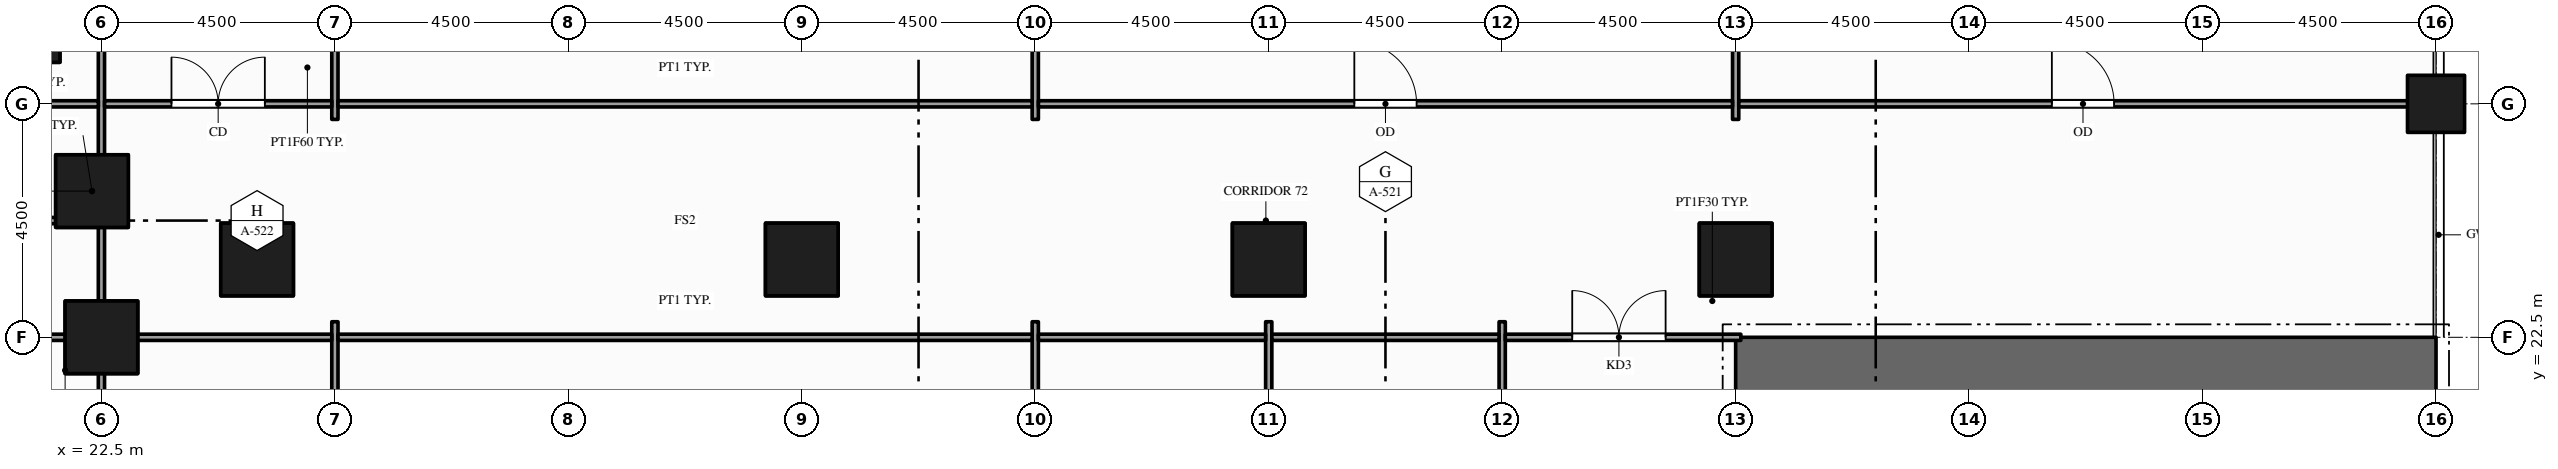
"""IFC4 building model, lengths in metres.
Left out: names, types, materials, properties, quantities, classifications, styles, units other than length and angle.
Written with IfcOpenShell. Run it as: python <this file> out.ifc"""

import sys

from ifc_helpers import new_model, si_unit, direction, frame, frame_2d, origin, origin_2d, place, context, subcontext, project, spatial, rectangle, hollow_rectangle, extrude, element, fill, save


model = new_model("IFC4")
c1 = context("Model", 3, precision=1e-05, world=origin(), true_north=direction((0.0, 1.0)))
c2 = subcontext(c1, "Body", "Model", "MODEL_VIEW")
j1 = project(units=[si_unit("LENGTHUNIT", "METRE"), si_unit("PLANEANGLEUNIT", "RADIAN")], contexts=[c1])
p1 = place(None, origin())
s1 = spatial("IfcSite", under=j1, at=p1, CompositionType="ELEMENT")
p2 = place(p1, origin())
s2 = spatial("IfcBuilding", under=s1, at=p2, CompositionType="ELEMENT")
p3 = place(p2, frame((0.0, 0.0, 24.0)))
s3 = spatial("IfcBuildingStorey", under=s2, at=p3, CompositionType="ELEMENT", Elevation=24.0)
p4 = place(p3, frame((54.0, 21.9, -0.15), z_axis=(0.0, 0.0, 1.0), x_axis=(1.0, 0.0, 0.0)))
e1 = element("IfcWall", 1, at=p4, inside=s3, PredefinedType="SHEAR", context=c2, shape_type="SweptSolid", body=[
    extrude(rectangle(XDim=13.5, YDim=1.2, at=frame_2d((6.75, 0.0))), origin(), (0.0, 0.0, 1.0), 5.0),
])
p5 = place(p3, frame((21.0, 28.5, -0.25), z_axis=(0.0, 0.0, 1.0), x_axis=(1.0, 0.0, 0.0)))
e2 = element("IfcColumn", 2, at=p5, inside=s3, PredefinedType="COLUMN", context=c2, shape_type="SweptSolid", body=[
    extrude(hollow_rectangle(XDim=1.4, YDim=1.4, WallThickness=0.08, at=origin_2d()), origin(), (0.0, 0.0, 1.0), 3.45),
])
p6 = place(p3, frame((21.0, 28.5, 3.2), z_axis=(0.0, 0.0, 1.0), x_axis=(1.0, 0.0, 0.0)))
e3 = element("IfcColumn", 3, at=p6, inside=s3, PredefinedType="COLUMN", context=c2, shape_type="SweptSolid", body=[
    extrude(rectangle(XDim=1.4, YDim=1.4, at=origin_2d()), origin(), (0.0, 0.0, 1.0), 1.5),
])
p7 = place(p3, frame((22.318, 25.318, -0.25), z_axis=(0.0, 0.0, 1.0), x_axis=(1.0, 0.0, 0.0)))
e4 = element("IfcColumn", 4, at=p7, inside=s3, PredefinedType="COLUMN", context=c2, shape_type="SweptSolid", body=[
    extrude(hollow_rectangle(XDim=1.4, YDim=1.4, WallThickness=0.08, at=origin_2d()), origin(), (0.0, 0.0, 1.0), 3.45),
])
p8 = place(p3, frame((22.318, 25.318, 3.2), z_axis=(0.0, 0.0, 1.0), x_axis=(1.0, 0.0, 0.0)))
e5 = element("IfcColumn", 5, at=p8, inside=s3, PredefinedType="COLUMN", context=c2, shape_type="SweptSolid", body=[
    extrude(rectangle(XDim=1.4, YDim=1.4, at=origin_2d()), origin(), (0.0, 0.0, 1.0), 1.5),
])
p9 = place(p3, frame((22.5, 22.5, -0.25), z_axis=(0.0, 0.0, 1.0), x_axis=(1.0, 0.0, 0.0)))
e6 = element("IfcColumn", 6, at=p9, inside=s3, PredefinedType="COLUMN", context=c2, shape_type="SweptSolid", body=[
    extrude(hollow_rectangle(XDim=1.4, YDim=1.4, WallThickness=0.08, at=origin_2d()), origin(), (0.0, 0.0, 1.0), 3.6),
])
p10 = place(p3, frame((22.5, 22.5, 3.35), z_axis=(0.0, 0.0, 1.0), x_axis=(1.0, 0.0, 0.0)))
e7 = element("IfcColumn", 7, at=p10, inside=s3, PredefinedType="COLUMN", context=c2, shape_type="SweptSolid", body=[
    extrude(rectangle(XDim=1.4, YDim=1.4, at=origin_2d()), origin(), (0.0, 0.0, 1.0), 1.5),
])
p11 = place(p3, frame((25.5, 24.0, -0.25), z_axis=(0.0, 0.0, 1.0), x_axis=(1.0, 0.0, 0.0)))
e8 = element("IfcColumn", 8, at=p11, inside=s3, PredefinedType="COLUMN", context=c2, shape_type="SweptSolid", body=[
    extrude(hollow_rectangle(XDim=1.4, YDim=1.4, WallThickness=0.08, at=origin_2d()), origin(), (0.0, 0.0, 1.0), 3.45),
])
p12 = place(p3, frame((25.5, 24.0, 3.2), z_axis=(0.0, 0.0, 1.0), x_axis=(1.0, 0.0, 0.0)))
e9 = element("IfcColumn", 9, at=p12, inside=s3, PredefinedType="COLUMN", context=c2, shape_type="SweptSolid", body=[
    extrude(rectangle(XDim=1.4, YDim=1.4, at=origin_2d()), origin(), (0.0, 0.0, 1.0), 1.5),
])
p13 = place(p3, frame((36.0, 24.0, -0.25), z_axis=(0.0, 0.0, 1.0), x_axis=(1.0, 0.0, 0.0)))
e10 = element("IfcColumn", 10, at=p13, inside=s3, PredefinedType="COLUMN", context=c2, shape_type="SweptSolid", body=[
    extrude(hollow_rectangle(XDim=1.4, YDim=1.4, WallThickness=0.08, at=origin_2d()), origin(), (0.0, 0.0, 1.0), 3.45),
])
p14 = place(p3, frame((36.0, 24.0, 3.2), z_axis=(0.0, 0.0, 1.0), x_axis=(1.0, 0.0, 0.0)))
e11 = element("IfcColumn", 11, at=p14, inside=s3, PredefinedType="COLUMN", context=c2, shape_type="SweptSolid", body=[
    extrude(rectangle(XDim=1.4, YDim=1.4, at=origin_2d()), origin(), (0.0, 0.0, 1.0), 1.5),
])
p15 = place(p3, frame((45.0, 24.0, -0.25), z_axis=(0.0, 0.0, 1.0), x_axis=(1.0, 0.0, 0.0)))
e12 = element("IfcColumn", 12, at=p15, inside=s3, PredefinedType="COLUMN", context=c2, shape_type="SweptSolid", body=[
    extrude(hollow_rectangle(XDim=1.4, YDim=1.4, WallThickness=0.08, at=origin_2d()), origin(), (0.0, 0.0, 1.0), 3.45),
])
p16 = place(p3, frame((45.0, 24.0, 3.2), z_axis=(0.0, 0.0, 1.0), x_axis=(1.0, 0.0, 0.0)))
e13 = element("IfcColumn", 13, at=p16, inside=s3, PredefinedType="COLUMN", context=c2, shape_type="SweptSolid", body=[
    extrude(rectangle(XDim=1.4, YDim=1.4, at=origin_2d()), origin(), (0.0, 0.0, 1.0), 1.5),
])
p17 = place(p3, frame((54.0, 24.0, -0.25), z_axis=(0.0, 0.0, 1.0), x_axis=(1.0, 0.0, 0.0)))
e14 = element("IfcColumn", 14, at=p17, inside=s3, PredefinedType="COLUMN", context=c2, shape_type="SweptSolid", body=[
    extrude(hollow_rectangle(XDim=1.4, YDim=1.4, WallThickness=0.08, at=origin_2d()), origin(), (0.0, 0.0, 1.0), 3.45),
])
p18 = place(p3, frame((54.0, 24.0, 3.2), z_axis=(0.0, 0.0, 1.0), x_axis=(1.0, 0.0, 0.0)))
e15 = element("IfcColumn", 15, at=p18, inside=s3, PredefinedType="COLUMN", context=c2, shape_type="SweptSolid", body=[
    extrude(rectangle(XDim=1.4, YDim=1.4, at=origin_2d()), origin(), (0.0, 0.0, 1.0), 1.5),
])
p19 = place(p3, frame((67.5, 27.0, -0.25), z_axis=(0.0, 0.0, 1.0), x_axis=(1.0, 0.0, 0.0)))
e16 = element("IfcColumn", 16, at=p19, inside=s3, PredefinedType="COLUMN", context=c2, shape_type="SweptSolid", body=[
    extrude(hollow_rectangle(XDim=1.1, YDim=1.1, WallThickness=0.06, at=origin_2d()), origin(), (0.0, 0.0, 1.0), 4.95),
])
p20 = place(p3, frame((22.5, 0.15, 0.0), z_axis=(0.0, 0.0, 1.0), x_axis=(0.0, 1.0, 0.0)))
e17 = element("IfcWall", 17, at=p20, inside=s3, PredefinedType="PARTITIONING", context=c2, shape_type="SweptSolid", body=[
    extrude(rectangle(XDim=35.95, YDim=0.12, at=frame_2d((17.975, 0.0))), origin(), (0.0, 0.0, 1.0), 3.3),
])
p21 = place(p20, frame((9.225, 0.0, 0.0)))
e18 = element("IfcOpeningElement", 18, at=p21, cuts=e17, PredefinedType="OPENING", context=c2, shape_type="SweptSolid", body=[
    extrude(rectangle(XDim=1.5, YDim=2.1, at=frame_2d((0.75, 1.05))), frame((0.0, 0.07, 0.0), z_axis=(0.0, -1.0, 0.0), x_axis=(1.0, 0.0, 0.0)), (0.0, 0.0, 1.0), 0.14),
])
p22 = place(p20, frame((32.7, 0.0, 0.0)))
e19 = element("IfcOpeningElement", 19, at=p22, cuts=e17, PredefinedType="OPENING", context=c2, shape_type="SweptSolid", body=[
    extrude(rectangle(XDim=1.8, YDim=2.1, at=frame_2d((0.9, 1.05))), frame((0.0, 0.07, 0.0), z_axis=(0.0, -1.0, 0.0), x_axis=(1.0, 0.0, 0.0)), (0.0, 0.0, 1.0), 0.14),
])
p23 = place(p3, frame((27.0, 10.95, 0.0), z_axis=(0.0, 0.0, 1.0), x_axis=(0.0, 1.0, 0.0)))
e20 = element("IfcWall", 20, at=p23, inside=s3, PredefinedType="PARTITIONING", context=c2, shape_type="SweptSolid", body=[
    extrude(rectangle(XDim=11.85, YDim=0.12, at=frame_2d((5.925, 0.0))), origin(), (0.0, 0.0, 1.0), 3.938),
])
p24 = place(p3, frame((27.0, 26.7, 0.0), z_axis=(0.0, 0.0, 1.0), x_axis=(0.0, 1.0, 0.0)))
e21 = element("IfcWall", 21, at=p24, inside=s3, PredefinedType="PARTITIONING", context=c2, shape_type="SweptSolid", body=[
    extrude(rectangle(XDim=22.65, YDim=0.12, at=frame_2d((11.325, 0.0))), origin(), (0.0, 0.0, 1.0), 3.61),
])
p25 = place(p24, frame((10.895, 0.0, 0.0)))
e22 = element("IfcOpeningElement", 22, at=p25, cuts=e21, PredefinedType="OPENING", context=c2, shape_type="SweptSolid", body=[
    extrude(rectangle(XDim=1.2, YDim=2.1, at=frame_2d((0.6, 1.05))), frame((0.0, 0.07, 0.0), z_axis=(0.0, -1.0, 0.0), x_axis=(1.0, 0.0, 0.0)), (0.0, 0.0, 1.0), 0.14),
])
p26 = place(p3, frame((40.5, 10.95, 0.0), z_axis=(0.0, 0.0, 1.0), x_axis=(0.0, 1.0, 0.0)))
e23 = element("IfcWall", 23, at=p26, inside=s3, PredefinedType="PARTITIONING", context=c2, shape_type="SweptSolid", body=[
    extrude(rectangle(XDim=11.85, YDim=0.12, at=frame_2d((5.925, 0.0))), origin(), (0.0, 0.0, 1.0), 3.938),
])
p27 = place(p3, frame((40.5, 26.7, 0.0), z_axis=(0.0, 0.0, 1.0), x_axis=(0.0, 1.0, 0.0)))
e24 = element("IfcWall", 24, at=p27, inside=s3, PredefinedType="PARTITIONING", context=c2, shape_type="SweptSolid", body=[
    extrude(rectangle(XDim=22.65, YDim=0.12, at=frame_2d((11.325, 0.0))), origin(), (0.0, 0.0, 1.0), 3.61),
])
p28 = place(p3, frame((45.0, 0.15, 0.0), z_axis=(0.0, 0.0, 1.0), x_axis=(0.0, 1.0, 0.0)))
e25 = element("IfcWall", 25, at=p28, inside=s3, PredefinedType="PARTITIONING", context=c2, shape_type="SweptSolid", body=[
    extrude(rectangle(XDim=22.65, YDim=0.12, at=frame_2d((11.325, 0.0))), origin(), (0.0, 0.0, 1.0), 3.3),
])
p29 = place(p28, frame((9.225, 0.0, 0.0)))
e26 = element("IfcOpeningElement", 26, at=p29, cuts=e25, PredefinedType="OPENING", context=c2, shape_type="SweptSolid", body=[
    extrude(rectangle(XDim=1.5, YDim=2.1, at=frame_2d((0.75, 1.05))), frame((0.0, 0.07, 0.0), z_axis=(0.0, -1.0, 0.0), x_axis=(1.0, 0.0, 0.0)), (0.0, 0.0, 1.0), 0.14),
])
p30 = place(p3, frame((49.5, 0.15, 0.0), z_axis=(0.0, 0.0, 1.0), x_axis=(0.0, 1.0, 0.0)))
e27 = element("IfcWall", 27, at=p30, inside=s3, PredefinedType="PARTITIONING", context=c2, shape_type="SweptSolid", body=[
    extrude(rectangle(XDim=22.65, YDim=0.12, at=frame_2d((11.325, 0.0))), origin(), (0.0, 0.0, 1.0), 3.3),
])
p31 = place(p30, frame((0.955, 0.0, 0.0)))
e28 = element("IfcOpeningElement", 28, at=p31, cuts=e27, PredefinedType="OPENING", context=c2, shape_type="SweptSolid", body=[
    extrude(rectangle(XDim=0.9, YDim=2.1, at=frame_2d((0.45, 1.05))), frame((0.0, 0.07, 0.0), z_axis=(0.0, -1.0, 0.0), x_axis=(1.0, 0.0, 0.0)), (0.0, 0.0, 1.0), 0.14),
])
p32 = place(p30, frame((3.9, 0.0, 0.0)))
e29 = element("IfcOpeningElement", 29, at=p32, cuts=e27, PredefinedType="OPENING", context=c2, shape_type="SweptSolid", body=[
    extrude(rectangle(XDim=0.9, YDim=2.1, at=frame_2d((0.45, 1.05))), frame((0.0, 0.07, 0.0), z_axis=(0.0, -1.0, 0.0), x_axis=(1.0, 0.0, 0.0)), (0.0, 0.0, 1.0), 0.14),
])
p33 = place(p30, frame((6.85, 0.0, 0.0)))
e30 = element("IfcOpeningElement", 30, at=p33, cuts=e27, PredefinedType="OPENING", context=c2, shape_type="SweptSolid", body=[
    extrude(rectangle(XDim=1.0, YDim=2.1, at=frame_2d((0.5, 1.05))), frame((0.0, 0.07, 0.0), z_axis=(0.0, -1.0, 0.0), x_axis=(1.0, 0.0, 0.0)), (0.0, 0.0, 1.0), 0.14),
])
p34 = place(p30, frame((16.275, 0.0, 0.0)))
e31 = element("IfcOpeningElement", 31, at=p34, cuts=e27, PredefinedType="OPENING", context=c2, shape_type="SweptSolid", body=[
    extrude(rectangle(XDim=0.9, YDim=2.1, at=frame_2d((0.45, 1.05))), frame((0.0, 0.07, 0.0), z_axis=(0.0, -1.0, 0.0), x_axis=(1.0, 0.0, 0.0)), (0.0, 0.0, 1.0), 0.14),
])
p35 = place(p30, frame((9.225, 0.0, 0.0)))
e32 = element("IfcOpeningElement", 32, at=p35, cuts=e27, PredefinedType="OPENING", context=c2, shape_type="SweptSolid", body=[
    extrude(rectangle(XDim=1.5, YDim=2.1, at=frame_2d((0.75, 1.05))), frame((0.0, 0.07, 0.0), z_axis=(0.0, -1.0, 0.0), x_axis=(1.0, 0.0, 0.0)), (0.0, 0.0, 1.0), 0.14),
])
p36 = place(p3, frame((54.0, 26.7, 0.0), z_axis=(0.0, 0.0, 1.0), x_axis=(0.0, 1.0, 0.0)))
e33 = element("IfcWall", 33, at=p36, inside=s3, PredefinedType="PARTITIONING", context=c2, shape_type="SweptSolid", body=[
    extrude(rectangle(XDim=22.65, YDim=0.12, at=frame_2d((11.325, 0.0))), origin(), (0.0, 0.0, 1.0), 3.61),
])
p37 = place(p3, frame((11.31, 22.5, 0.0), z_axis=(0.0, 0.0, 1.0), x_axis=(1.0, 0.0, 0.0)))
e34 = element("IfcWall", 34, at=p37, inside=s3, PredefinedType="PARTITIONING", context=c2, shape_type="SweptSolid", body=[
    extrude(rectangle(XDim=11.13, YDim=0.12, at=frame_2d((5.565, 0.0))), origin(), (0.0, 0.0, 1.0), 3.6),
])
p38 = place(p3, frame((22.56, 22.5, 0.0), z_axis=(0.0, 0.0, 1.0), x_axis=(1.0, 0.0, 0.0)))
e35 = element("IfcWall", 35, at=p38, inside=s3, PredefinedType="PARTITIONING", context=c2, shape_type="SweptSolid", body=[
    extrude(rectangle(XDim=4.38, YDim=0.12, at=frame_2d((2.19, 0.0))), origin(), (0.0, 0.0, 1.0), 3.788),
])
p39 = place(p3, frame((27.06, 22.5, 0.0), z_axis=(0.0, 0.0, 1.0), x_axis=(1.0, 0.0, 0.0)))
e36 = element("IfcWall", 36, at=p39, inside=s3, PredefinedType="PARTITIONING", context=c2, shape_type="SweptSolid", body=[
    extrude(rectangle(XDim=13.38, YDim=0.12, at=frame_2d((6.69, 0.0))), origin(), (0.0, 0.0, 1.0), 3.938),
])
for number, where, z_axis, x_axis in (
    (37, (40.56, 22.5, 0.0), (0.0, 0.0, 1.0), (1.0, 0.0, 0.0)),
    (38, (45.06, 22.5, 0.0), (0.0, 0.0, 1.0), (1.0, 0.0, 0.0)),
):
    element("IfcWall", number, at=place(p3, frame(where, z_axis=z_axis, x_axis=x_axis)), inside=s3, PredefinedType="PARTITIONING", context=c2, shape_type="SweptSolid", body=[
        extrude(rectangle(XDim=4.38, YDim=0.12, at=frame_2d((2.19, 0.0))), origin(), (0.0, 0.0, 1.0), 3.938),
    ])
p40 = place(p3, frame((49.56, 22.5, 0.0), z_axis=(0.0, 0.0, 1.0), x_axis=(1.0, 0.0, 0.0)))
e39 = element("IfcWall", 39, at=p40, inside=s3, PredefinedType="PARTITIONING", context=c2, shape_type="SweptSolid", body=[
    extrude(rectangle(XDim=4.54, YDim=0.12, at=frame_2d((2.27, 0.0))), origin(), (0.0, 0.0, 1.0), 3.938),
])
p41 = place(p40, frame((1.29, 0.0, 0.0)))
e40 = element("IfcOpeningElement", 40, at=p41, cuts=e39, PredefinedType="OPENING", context=c2, shape_type="SweptSolid", body=[
    extrude(rectangle(XDim=1.8, YDim=2.1, at=frame_2d((0.9, 1.05))), frame((0.0, 0.07, 0.0), z_axis=(0.0, -1.0, 0.0), x_axis=(1.0, 0.0, 0.0)), (0.0, 0.0, 1.0), 0.14),
])
p42 = place(p3, frame((11.31, 24.75, 0.0), z_axis=(0.0, 0.0, 1.0), x_axis=(1.0, 0.0, 0.0)))
e41 = element("IfcWall", 41, at=p42, inside=s3, PredefinedType="PARTITIONING", context=c2, shape_type="SweptSolid", body=[
    extrude(rectangle(XDim=11.13, YDim=0.12, at=frame_2d((5.565, 0.0))), origin(), (0.0, 0.0, 1.0), 3.938),
])
p43 = place(p3, frame((22.56, 24.75, 0.0), z_axis=(0.0, 0.0, 1.0), x_axis=(1.0, 0.0, 0.0)))
e42 = element("IfcWall", 42, at=p43, inside=s3, PredefinedType="PARTITIONING", context=c2, shape_type="SweptSolid", body=[
    extrude(rectangle(XDim=0.24, YDim=0.12, at=frame_2d((0.12, 0.0))), origin(), (0.0, 0.0, 1.0), 4.85),
])
p44 = place(p3, frame((11.31, 27.0, 0.0), z_axis=(0.0, 0.0, 1.0), x_axis=(1.0, 0.0, 0.0)))
e43 = element("IfcWall", 43, at=p44, inside=s3, PredefinedType="PARTITIONING", context=c2, shape_type="SweptSolid", body=[
    extrude(rectangle(XDim=11.13, YDim=0.12, at=frame_2d((5.565, 0.0))), origin(), (0.0, 0.0, 1.0), 3.788),
])
p45 = place(p3, frame((22.56, 27.0, 0.0), z_axis=(0.0, 0.0, 1.0), x_axis=(1.0, 0.0, 0.0)))
e44 = element("IfcWall", 44, at=p45, inside=s3, PredefinedType="PARTITIONING", context=c2, shape_type="SweptSolid", body=[
    extrude(rectangle(XDim=4.38, YDim=0.12, at=frame_2d((2.19, 0.0))), origin(), (0.0, 0.0, 1.0), 3.61),
])
p46 = place(p45, frame((1.29, 0.0, 0.0)))
e45 = element("IfcOpeningElement", 45, at=p46, cuts=e44, PredefinedType="OPENING", context=c2, shape_type="SweptSolid", body=[
    extrude(rectangle(XDim=1.8, YDim=2.1, at=frame_2d((0.9, 1.05))), frame((0.0, 0.07, 0.0), z_axis=(0.0, -1.0, 0.0), x_axis=(1.0, 0.0, 0.0)), (0.0, 0.0, 1.0), 0.14),
])
p47 = place(p3, frame((27.06, 27.0, 0.0), z_axis=(0.0, 0.0, 1.0), x_axis=(1.0, 0.0, 0.0)))
e46 = element("IfcWall", 46, at=p47, inside=s3, PredefinedType="PARTITIONING", context=c2, shape_type="SweptSolid", body=[
    extrude(rectangle(XDim=13.38, YDim=0.12, at=frame_2d((6.69, 0.0))), origin(), (0.0, 0.0, 1.0), 3.61),
])
p48 = place(p3, frame((40.56, 27.0, 0.0), z_axis=(0.0, 0.0, 1.0), x_axis=(1.0, 0.0, 0.0)))
e47 = element("IfcWall", 47, at=p48, inside=s3, PredefinedType="PARTITIONING", context=c2, shape_type="SweptSolid", body=[
    extrude(rectangle(XDim=13.38, YDim=0.12, at=frame_2d((6.69, 0.0))), origin(), (0.0, 0.0, 1.0), 3.61),
])
p49 = place(p48, frame((6.09, 0.0, 0.0)))
e48 = element("IfcOpeningElement", 48, at=p49, cuts=e47, PredefinedType="OPENING", context=c2, shape_type="SweptSolid", body=[
    extrude(rectangle(XDim=1.2, YDim=2.1, at=frame_2d((0.6, 1.05))), frame((0.0, 0.07, 0.0), z_axis=(0.0, -1.0, 0.0), x_axis=(1.0, 0.0, 0.0)), (0.0, 0.0, 1.0), 0.14),
])
p50 = place(p3, frame((54.06, 27.0, 0.0), z_axis=(0.0, 0.0, 1.0), x_axis=(1.0, 0.0, 0.0)))
e49 = element("IfcWall", 49, at=p50, inside=s3, PredefinedType="PARTITIONING", context=c2, shape_type="SweptSolid", body=[
    extrude(rectangle(XDim=13.29, YDim=0.12, at=frame_2d((6.645, 0.0))), origin(), (0.0, 0.0, 1.0), 3.61),
])
p51 = place(p50, frame((6.035, 0.0, 0.0)))
e50 = element("IfcOpeningElement", 50, at=p51, cuts=e49, PredefinedType="OPENING", context=c2, shape_type="SweptSolid", body=[
    extrude(rectangle(XDim=1.2, YDim=2.1, at=frame_2d((0.6, 1.05))), frame((0.0, 0.07, 0.0), z_axis=(0.0, -1.0, 0.0), x_axis=(1.0, 0.0, 0.0)), (0.0, 0.0, 1.0), 0.14),
])
p52 = place(p41, origin())
e51 = element("IfcDoor", 51, at=p52, inside=s3, OperationType="DOUBLE_DOOR_SINGLE_SWING", PredefinedType="DOOR", context=c2, shape_type="SweptSolid", body=[
    extrude(rectangle(XDim=1.8, YDim=2.1, at=frame_2d((0.9, 1.05))), frame((0.0, 0.025, 0.0), z_axis=(0.0, -1.0, 0.0), x_axis=(1.0, 0.0, 0.0)), (0.0, 0.0, 1.0), 0.05),
])
fill(e40, e51)
p53 = place(p46, origin())
e52 = element("IfcDoor", 52, at=p53, inside=s3, OperationType="DOUBLE_DOOR_SINGLE_SWING", PredefinedType="DOOR", context=c2, shape_type="SweptSolid", body=[
    extrude(rectangle(XDim=1.8, YDim=2.1, at=frame_2d((0.9, 1.05))), frame((0.0, 0.025, 0.0), z_axis=(0.0, -1.0, 0.0), x_axis=(1.0, 0.0, 0.0)), (0.0, 0.0, 1.0), 0.05),
])
fill(e45, e52)
p54 = place(p49, origin())
e53 = element("IfcDoor", 53, at=p54, inside=s3, OperationType="SINGLE_SWING_LEFT", PredefinedType="DOOR", context=c2, shape_type="SweptSolid", body=[
    extrude(rectangle(XDim=1.2, YDim=2.1, at=frame_2d((0.6, 1.05))), frame((0.0, 0.025, 0.0), z_axis=(0.0, -1.0, 0.0), x_axis=(1.0, 0.0, 0.0)), (0.0, 0.0, 1.0), 0.05),
])
fill(e48, e53)
p55 = place(p51, origin())
e54 = element("IfcDoor", 54, at=p55, inside=s3, OperationType="SINGLE_SWING_LEFT", PredefinedType="DOOR", context=c2, shape_type="SweptSolid", body=[
    extrude(rectangle(XDim=1.2, YDim=2.1, at=frame_2d((0.6, 1.05))), frame((0.0, 0.025, 0.0), z_axis=(0.0, -1.0, 0.0), x_axis=(1.0, 0.0, 0.0)), (0.0, 0.0, 1.0), 0.05),
])
fill(e50, e54)
save(model, sys.argv[1])
